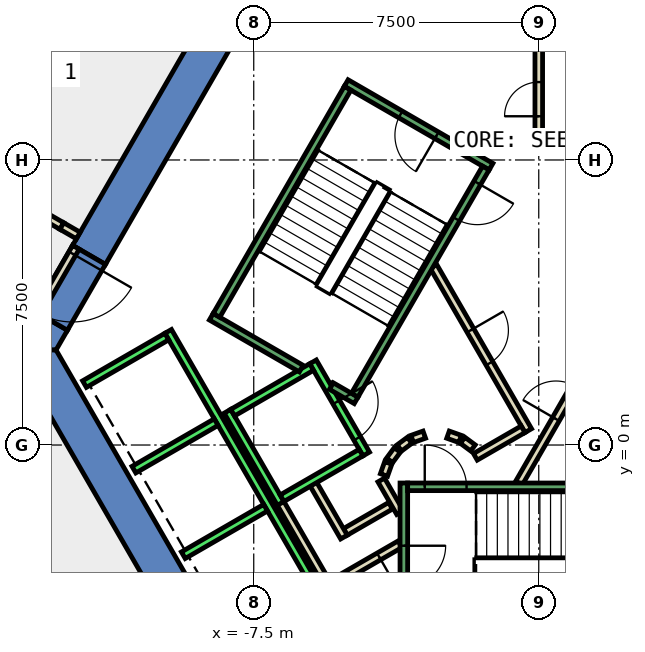
"""IFC4 building model, lengths in metres.
Left out: names, types, materials, properties, quantities, classifications, styles, units other than length and angle.
Written with IfcOpenShell. Run it as: python <this file> out.ifc"""

import sys

from ifc_helpers import new_model, si_unit, direction, frame, frame_2d, origin, place, context, subcontext, project, spatial, polyline, rectangle, outline, extrude, element, fill, save


model = new_model("IFC4")
c1 = context("Model", 3, precision=1e-05, world=origin(), true_north=direction((0.0, 1.0)))
c2 = subcontext(c1, "Body", "Model", "MODEL_VIEW")
j1 = project(units=[si_unit("LENGTHUNIT", "METRE"), si_unit("PLANEANGLEUNIT", "RADIAN")], contexts=[c1])
p1 = place(None, origin())
s1 = spatial("IfcSite", under=j1, at=p1, CompositionType="ELEMENT")
p2 = place(p1, origin())
s2 = spatial("IfcBuilding", under=s1, at=p2, CompositionType="ELEMENT")
p3 = place(p2, frame((0.0, 0.0, 60.2)))
s3 = spatial("IfcBuildingStorey", under=s2, at=p3, CompositionType="ELEMENT", Elevation=60.2)
p4 = place(p3, frame((0.0, 0.0, -0.4)))
e1 = element("IfcWall", 1, at=p4, inside=s3, PredefinedType="SHEAR", context=c2, shape_type="SweptSolid", body=[
    extrude(outline(polyline([(-12.267, 5.252), (-11.402, 4.752), (-6.351, 13.5), (-6.928, 14.5), (-12.267, 5.252)])), origin(), (0.0, 0.0, 1.0), 4.2),
])
p5 = place(p3, frame((0.0, 0.0, -0.4)))
e2 = element("IfcWall", 2, at=p5, inside=s3, PredefinedType="SHEAR", context=c2, shape_type="SweptSolid", body=[
    extrude(outline(polyline([(-12.402, 3.02), (-13.267, 3.52), (-13.856, 2.5), (-12.702, 2.5), (-12.402, 3.02)])), origin(), (0.0, 0.0, 1.0), 4.2),
])
p6 = place(p3, frame((0.0, 0.0, 3.6)))
e3 = element("IfcWall", 3, at=p6, inside=s3, PredefinedType="SHEAR", context=c2, shape_type="SweptSolid", body=[
    extrude(outline(polyline([(-13.267, 3.52), (-12.402, 3.02), (-11.402, 4.752), (-12.267, 5.252), (-13.267, 3.52)])), origin(), (0.0, 0.0, 1.0), 0.2),
])
p7 = place(p3, frame((0.0, 0.0, -0.4)))
e4 = element("IfcWall", 4, at=p7, inside=s3, PredefinedType="SHEAR", context=c2, shape_type="SweptSolid", body=[
    extrude(outline(polyline([(-13.856, 2.5), (-6.928, -9.5), (-6.351, -8.5), (-12.702, 2.5), (-13.856, 2.5)])), origin(), (0.0, 0.0, 1.0), 4.2),
])
p8 = place(p3, frame((-17.783, 8.783, 0.0), z_axis=(0.0, 0.0, 1.0), x_axis=(0.866041598752, -0.499971948444, 0.0)))
e5 = element("IfcWall", 5, at=p8, inside=s3, PredefinedType="PARTITIONING", context=c2, shape_type="SweptSolid", body=[
    extrude(rectangle(XDim=6.042, YDim=0.2, at=frame_2d((3.021, 0.0))), origin(), (0.0, 0.0, 1.0), 3.8),
])
p9 = place(p8, frame((2.771, 0.0, 0.0)))
e6 = element("IfcOpeningElement", 6, at=p9, cuts=e5, PredefinedType="OPENING", context=c2, shape_type="SweptSolid", body=[
    extrude(rectangle(XDim=1.0, YDim=2.1, at=frame_2d((0.5, 1.05))), frame((0.0, 0.11, 0.0), z_axis=(0.0, -1.0, 0.0), x_axis=(1.0, 0.0, 0.0)), (0.0, 0.0, 1.0), 0.22),
])
p10 = place(p3, frame((1.88, 7.8, 0.0), z_axis=(0.0, 0.0, 1.0), x_axis=(-1.0, 0.0, 0.0)))
e7 = element("IfcWall", 7, at=p10, inside=s3, PredefinedType="PARTITIONING", context=c2, shape_type="SweptSolid", body=[
    extrude(rectangle(XDim=1.78, YDim=0.2, at=frame_2d((0.89, 0.0))), origin(), (0.0, 0.0, 1.0), 3.8),
])
p11 = place(p3, frame((0.0, 7.7, 0.0), z_axis=(0.0, 0.0, 1.0), x_axis=(0.000325520816, 0.999999947018, 0.0)))
e8 = element("IfcWall", 8, at=p11, inside=s3, PredefinedType="PARTITIONING", context=c2, shape_type="SweptSolid", body=[
    extrude(rectangle(XDim=3.0, YDim=0.2, at=frame_2d((1.5, 0.0))), origin(), (0.0, 0.0, 1.0), 3.8),
])
p12 = place(p11, frame((0.95, 0.0, 0.0)))
e9 = element("IfcOpeningElement", 9, at=p12, cuts=e8, PredefinedType="OPENING", context=c2, shape_type="SweptSolid", body=[
    extrude(rectangle(XDim=0.9, YDim=2.1, at=frame_2d((0.45, 1.05))), frame((0.0, 0.11, 0.0), z_axis=(0.0, -1.0, 0.0), x_axis=(1.0, 0.0, 0.0)), (0.0, 0.0, 1.0), 0.22),
])
p13 = place(p3, frame((-3.9, -1.599, 0.0), z_axis=(0.0, 0.0, 1.0), x_axis=(-0.865969445389, -0.500096910261, 0.0)))
e10 = element("IfcWall", 10, at=p13, inside=s3, PredefinedType="PARTITIONING", context=c2, shape_type="SweptSolid", body=[
    extrude(rectangle(XDim=1.373, YDim=0.2, at=frame_2d((0.687, 0.0))), origin(), (0.0, 0.0, 1.0), 3.8),
])
p14 = place(p3, frame((-5.126, -2.422, 0.0), z_axis=(0.0, 0.0, 1.0), x_axis=(-0.500062241894, 0.865989465428, 0.0)))
e11 = element("IfcWall", 11, at=p14, inside=s3, PredefinedType="PARTITIONING", context=c2, shape_type="SweptSolid", body=[
    extrude(rectangle(XDim=1.7, YDim=0.2, at=frame_2d((0.85, 0.0))), origin(), (0.0, 0.0, 1.0), 3.8),
])
p15 = place(p3, frame((-3.65, -2.61, 0.0), z_axis=(0.0, 0.0, 1.0), x_axis=(-0.866072462134, -0.499918483688, 0.0)))
e12 = element("IfcWall", 12, at=p15, inside=s3, PredefinedType="PARTITIONING", context=c2, shape_type="SweptSolid", body=[
    extrude(rectangle(XDim=2.084, YDim=0.2, at=frame_2d((1.042, 0.0))), origin(), (0.0, 0.0, 1.0), 3.8),
])
p16 = place(p15, frame((0.642, 0.0, 0.0)))
e13 = element("IfcOpeningElement", 13, at=p16, cuts=e12, PredefinedType="OPENING", context=c2, shape_type="SweptSolid", body=[
    extrude(rectangle(XDim=0.9, YDim=2.1, at=frame_2d((0.45, 1.05))), frame((0.0, 0.11, 0.0), z_axis=(0.0, -1.0, 0.0), x_axis=(1.0, 0.0, 0.0)), (0.0, 0.0, 1.0), 0.22),
])
p17 = place(p3, frame((-5.492, -3.788, 0.0), z_axis=(0.0, 0.0, 1.0), x_axis=(-0.500008949224, 0.866020236886, 0.0)))
e14 = element("IfcWall", 14, at=p17, inside=s3, PredefinedType="PARTITIONING", context=c2, shape_type="SweptSolid", body=[
    extrude(rectangle(XDim=2.68, YDim=0.2, at=frame_2d((1.34, 0.0))), origin(), (0.0, 0.0, 1.0), 3.8),
])
p18 = place(p3, frame((-4.145, -0.92, 0.0), z_axis=(0.0, 0.0, 1.0), x_axis=(0.499743786207, -0.866173278362, 0.0)))
e15 = element("IfcWall", 15, at=p18, inside=s3, PredefinedType="PARTITIONING", context=c2, shape_type="SweptSolid", body=[
    extrude(rectangle(XDim=0.991, YDim=0.2, at=frame_2d((0.495, 0.0))), origin(), (0.0, 0.0, 1.0), 3.8),
])
p19 = place(p3, frame((-0.52, -1.0, 0.0), z_axis=(0.0, 0.0, 1.0), x_axis=(0.50011622646, 0.865958290007, 0.0)))
e16 = element("IfcWall", 16, at=p19, inside=s3, PredefinedType="PARTITIONING", context=c2, shape_type="SweptSolid", body=[
    extrude(rectangle(XDim=4.991, YDim=0.2, at=frame_2d((2.496, 0.0))), origin(), (0.0, 0.0, 1.0), 3.8),
])
p20 = place(p19, frame((1.945, 0.0, 0.0)))
e17 = element("IfcOpeningElement", 17, at=p20, cuts=e16, PredefinedType="OPENING", context=c2, shape_type="SweptSolid", body=[
    extrude(rectangle(XDim=1.0, YDim=2.1, at=frame_2d((0.5, 1.05))), frame((0.0, 0.11, 0.0), z_axis=(0.0, -1.0, 0.0), x_axis=(1.0, 0.0, 0.0)), (0.0, 0.0, 1.0), 0.22),
])
p21 = place(p3, frame((-2.771, 4.7, 0.0), z_axis=(0.0, 0.0, 1.0), x_axis=(0.499969479948, -0.866043023828, 0.0)))
e18 = element("IfcWall", 18, at=p21, inside=s3, PredefinedType="PARTITIONING", context=c2, shape_type="SweptSolid", body=[
    extrude(rectangle(XDim=4.99, YDim=0.2, at=frame_2d((2.495, 0.0))), origin(), (0.0, 0.0, 1.0), 3.8),
])
p22 = place(p21, frame((1.945, 0.0, 0.0)))
e19 = element("IfcOpeningElement", 19, at=p22, cuts=e18, PredefinedType="OPENING", context=c2, shape_type="SweptSolid", body=[
    extrude(rectangle(XDim=1.0, YDim=2.1, at=frame_2d((0.5, 1.05))), frame((0.0, 0.11, 0.0), z_axis=(0.0, -1.0, 0.0), x_axis=(1.0, 0.0, 0.0)), (0.0, 0.0, 1.0), 0.22),
])
p23 = place(p3, frame((-0.412, 0.414, 0.0), z_axis=(0.0, 0.0, 1.0), x_axis=(-0.866017369001, -0.500013916395, 0.0)))
e20 = element("IfcWall", 20, at=p23, inside=s3, PredefinedType="PARTITIONING", context=c2, shape_type="SweptSolid", body=[
    extrude(rectangle(XDim=1.45, YDim=0.2, at=frame_2d((0.725, 0.0))), origin(), (0.0, 0.0, 1.0), 3.8),
])
p24 = place(p3, frame((-1.731, -0.077, 0.0), z_axis=(0.0, 0.0, 1.0), x_axis=(-0.804311165252, 0.594208338422, 0.0)))
e21 = element("IfcWall", 21, at=p24, inside=s3, PredefinedType="PARTITIONING", context=c2, shape_type="SweptSolid", body=[
    extrude(rectangle(XDim=0.338, YDim=0.2, at=frame_2d((0.169, 0.0))), origin(), (0.0, 0.0, 1.0), 3.8),
])
p25 = place(p3, frame((-2.07, 0.16, 0.0), z_axis=(0.0, 0.0, 1.0), x_axis=(-0.942199461132, 0.335052496547, 0.0)))
e22 = element("IfcWall", 22, at=p25, inside=s3, PredefinedType="PARTITIONING", context=c2, shape_type="SweptSolid", body=[
    extrude(rectangle(XDim=0.337, YDim=0.2, at=frame_2d((0.169, 0.0))), origin(), (0.0, 0.0, 1.0), 3.8),
])
p26 = place(p3, frame((-3.012, 0.273, 0.0), z_axis=(0.0, 0.0, 1.0), x_axis=(-0.942280615813, -0.334824194261, 0.0)))
e23 = element("IfcWall", 23, at=p26, inside=s3, PredefinedType="PARTITIONING", context=c2, shape_type="SweptSolid", body=[
    extrude(rectangle(XDim=0.338, YDim=0.2, at=frame_2d((0.169, 0.0))), origin(), (0.0, 0.0, 1.0), 3.8),
])
p27 = place(p3, frame((-3.397, 0.124, 0.0), z_axis=(0.0, 0.0, 1.0), x_axis=(-0.804311165252, -0.594208338422, 0.0)))
e24 = element("IfcWall", 24, at=p27, inside=s3, PredefinedType="PARTITIONING", context=c2, shape_type="SweptSolid", body=[
    extrude(rectangle(XDim=0.338, YDim=0.2, at=frame_2d((0.169, 0.0))), origin(), (0.0, 0.0, 1.0), 3.8),
])
p28 = place(p3, frame((-3.723, -0.131, 0.0), z_axis=(0.0, 0.0, 1.0), x_axis=(-0.594675113454, -0.803966112121, 0.0)))
e25 = element("IfcWall", 25, at=p28, inside=s3, PredefinedType="PARTITIONING", context=c2, shape_type="SweptSolid", body=[
    extrude(rectangle(XDim=0.338, YDim=0.2, at=frame_2d((0.169, 0.0))), origin(), (0.0, 0.0, 1.0), 3.8),
])
p29 = place(p3, frame((-3.96, -0.47, 0.0), z_axis=(0.0, 0.0, 1.0), x_axis=(-0.334824194261, -0.942280615813, 0.0)))
e26 = element("IfcWall", 26, at=p29, inside=s3, PredefinedType="PARTITIONING", context=c2, shape_type="SweptSolid", body=[
    extrude(rectangle(XDim=0.338, YDim=0.2, at=frame_2d((0.169, 0.0))), origin(), (0.0, 0.0, 1.0), 3.8),
])
p30 = place(p3, frame((-12.18, 5.202, 0.0), z_axis=(0.0, 0.0, 1.0), x_axis=(-0.50002537861, -0.866010750942, 0.0)))
e27 = element("IfcWall", 27, at=p30, inside=s3, PredefinedType="PARTITIONING", context=c2, shape_type="SweptSolid", body=[
    extrude(rectangle(XDim=2.0, YDim=0.2, at=frame_2d((1.0, 0.0))), origin(), (0.0, 0.0, 1.0), 2.4),
])
p31 = place(p30, frame((0.19, 0.0, 0.0)))
e28 = element("IfcOpeningElement", 28, at=p31, cuts=e27, PredefinedType="OPENING", context=c2, shape_type="SweptSolid", body=[
    extrude(rectangle(XDim=1.8, YDim=2.1, at=frame_2d((0.9, 1.05))), frame((0.0, 0.11, 0.0), z_axis=(0.0, -1.0, 0.0), x_axis=(1.0, 0.0, 0.0)), (0.0, 0.0, 1.0), 0.22),
])
p32 = place(p3, frame((-12.55, 5.762, 0.0), z_axis=(0.0, 0.0, 1.0), x_axis=(0.866071776036, -0.499919672301, 0.0)))
e29 = element("IfcWall", 29, at=p32, inside=s3, PredefinedType="PARTITIONING", context=c2, shape_type="SweptSolid", body=[
    extrude(rectangle(XDim=0.5, YDim=0.2, at=frame_2d((0.25, 0.0))), origin(), (0.0, 0.0, 1.0), 2.4),
])
p33 = place(p3, frame((-5.94, 2.188, 0.0), z_axis=(0.0, 0.0, 1.0), x_axis=(0.49994636267, -0.866056369097, 0.0)))
e30 = element("IfcWall", 30, at=p33, inside=s3, PredefinedType="STANDARD", context=c2, shape_type="SweptSolid", body=[
    extrude(rectangle(XDim=2.8, YDim=0.2, at=frame_2d((1.4, 0.0))), origin(), (0.0, 0.0, 1.0), 3.8),
])
p34 = place(p33, frame((1.225, 0.0, 0.0)))
e31 = element("IfcOpeningElement", 31, at=p34, cuts=e30, PredefinedType="OPENING", context=c2, shape_type="SweptSolid", body=[
    extrude(rectangle(XDim=1.1, YDim=2.1, at=frame_2d((0.55, 1.05))), frame((0.0, 0.11, 0.0), z_axis=(0.0, -1.0, 0.0), x_axis=(1.0, 0.0, 0.0)), (0.0, 0.0, 1.0), 0.22),
])
p35 = place(p3, frame((-8.192, 0.888, 0.0), z_axis=(0.0, 0.0, 1.0), x_axis=(0.49994636267, -0.866056369097, 0.0)))
e32 = element("IfcWall", 32, at=p35, inside=s3, PredefinedType="STANDARD", context=c2, shape_type="SweptSolid", body=[
    extrude(rectangle(XDim=2.8, YDim=0.2, at=frame_2d((1.4, 0.0))), origin(), (0.0, 0.0, 1.0), 3.8),
])
for number, where, z_axis, x_axis in (
    (33, (-5.977, 2.052, 0.0), (0.0, 0.0, 1.0), (-0.866, -0.5, 0.0)),
    (34, (-4.677, -0.2, 0.0), (0.0, 0.0, 1.0), (-0.866, -0.5, 0.0)),
):
    element("IfcWall", number, at=place(p3, frame(where, z_axis=z_axis, x_axis=x_axis)), inside=s3, PredefinedType="STANDARD", context=c2, shape_type="SweptSolid", body=[
        extrude(rectangle(XDim=2.399, YDim=0.2, at=frame_2d((1.2, 0.0))), origin(), (0.0, 0.0, 1.0), 3.8),
    ])
p36 = place(p3, frame((-9.751, 2.99, 0.0), z_axis=(0.0, 0.0, 1.0), x_axis=(0.50000090737, -0.866024879913, 0.0)))
e35 = element("IfcWall", 35, at=p36, inside=s3, PredefinedType="STANDARD", context=c2, shape_type="SweptSolid", body=[
    extrude(rectangle(XDim=10.6, YDim=0.2, at=frame_2d((5.3, 0.0))), origin(), (0.0, 0.0, 1.0), 3.8),
])
p37 = place(p3, frame((-9.788, 2.853, 0.0), z_axis=(0.0, 0.0, 1.0), x_axis=(-0.865998541277, -0.500046524342, 0.0)))
e36 = element("IfcWall", 36, at=p37, inside=s3, PredefinedType="STANDARD", context=c2, shape_type="SweptSolid", body=[
    extrude(rectangle(XDim=2.5, YDim=0.2, at=frame_2d((1.25, 0.0))), origin(), (0.0, 0.0, 1.0), 3.8),
])
for number, where, z_axis, x_axis in (
    (37, (-8.488, 0.602, 0.0), (0.0, 0.0, 1.0), (-0.866, -0.5, 0.0)),
    (38, (-7.188, -1.65, 0.0), (0.0, 0.0, 1.0), (-0.866, -0.5, 0.0)),
):
    element("IfcWall", number, at=place(p3, frame(where, z_axis=z_axis, x_axis=x_axis)), inside=s3, PredefinedType="STANDARD", context=c2, shape_type="SweptSolid", body=[
        extrude(rectangle(XDim=2.5, YDim=0.2, at=frame_2d((1.25, 0.0))), origin(), (0.0, 0.0, 1.0), 3.8),
    ])
p38 = place(p3, frame((-3.55, -1.0, 0.0), z_axis=(0.0, 0.0, 1.0), x_axis=(0.0, -1.0, 0.0)))
e39 = element("IfcWall", 39, at=p38, inside=s3, PredefinedType="STANDARD", context=c2, shape_type="SweptSolid", body=[
    extrude(rectangle(XDim=4.4, YDim=0.2, at=frame_2d((2.2, 0.0))), origin(), (0.0, 0.0, 1.0), 3.8),
])
p39 = place(p38, frame((1.65, 0.0, 0.0)))
e40 = element("IfcOpeningElement", 40, at=p39, cuts=e39, PredefinedType="OPENING", context=c2, shape_type="SweptSolid", body=[
    extrude(rectangle(XDim=1.1, YDim=2.2, at=frame_2d((0.55, 1.1))), frame((0.0, 0.11, 0.0), z_axis=(0.0, -1.0, 0.0), x_axis=(1.0, 0.0, 0.0)), (0.0, 0.0, 1.0), 0.22),
])
p40 = place(p3, frame((-3.45, -1.1, 0.0), z_axis=(0.0, 0.0, 1.0), x_axis=(1.0, 0.0, 0.0)))
e41 = element("IfcWall", 41, at=p40, inside=s3, PredefinedType="STANDARD", context=c2, shape_type="SweptSolid", body=[
    extrude(rectangle(XDim=6.9, YDim=0.2, at=frame_2d((3.45, 0.0))), origin(), (0.0, 0.0, 1.0), 3.8),
])
p41 = place(p40, frame((0.45, 0.0, 0.0)))
e42 = element("IfcOpeningElement", 42, at=p41, cuts=e41, PredefinedType="OPENING", context=c2, shape_type="SweptSolid", body=[
    extrude(rectangle(XDim=1.1, YDim=2.2, at=frame_2d((0.55, 1.1))), frame((0.0, 0.11, 0.0), z_axis=(0.0, -1.0, 0.0), x_axis=(1.0, 0.0, 0.0)), (0.0, 0.0, 1.0), 0.22),
])
p42 = place(p3, frame((-1.256, 7.324, 0.0), z_axis=(0.0, 0.0, 1.0), x_axis=(-0.866046073146, 0.499964197906, 0.0)))
e43 = element("IfcWall", 43, at=p42, inside=s3, PredefinedType="STANDARD", context=c2, shape_type="SweptSolid", body=[
    extrude(rectangle(XDim=4.4, YDim=0.2, at=frame_2d((2.2, 0.0))), origin(), (0.0, 0.0, 1.0), 3.8),
])
p43 = place(p42, frame((1.65, 0.0, 0.0)))
e44 = element("IfcOpeningElement", 44, at=p43, cuts=e43, PredefinedType="OPENING", context=c2, shape_type="SweptSolid", body=[
    extrude(rectangle(XDim=1.1, YDim=2.2, at=frame_2d((0.55, 1.1))), frame((0.0, 0.11, 0.0), z_axis=(0.0, -1.0, 0.0), x_axis=(1.0, 0.0, 0.0)), (0.0, 0.0, 1.0), 0.22),
])
p44 = place(p3, frame((-6.25, 2.01, 0.0), z_axis=(0.0, 0.0, 1.0), x_axis=(-0.86611865017, 0.499838457731, 0.0)))
e45 = element("IfcWall", 45, at=p44, inside=s3, PredefinedType="STANDARD", context=c2, shape_type="SweptSolid", body=[
    extrude(rectangle(XDim=2.733, YDim=0.2, at=frame_2d((1.366, 0.0))), origin(), (0.0, 0.0, 1.0), 3.8),
])
p45 = place(p3, frame((-4.806, 1.176, 0.0), z_axis=(0.0, 0.0, 1.0), x_axis=(-0.866558586415, 0.499075361355, 0.0)))
e46 = element("IfcWall", 46, at=p45, inside=s3, PredefinedType="STANDARD", context=c2, shape_type="SweptSolid", body=[
    extrude(rectangle(XDim=0.751, YDim=0.2, at=frame_2d((0.376, 0.0))), origin(), (0.0, 0.0, 1.0), 3.8),
])
p46 = place(p3, frame((-1.393, 7.288, 0.0), z_axis=(0.0, 0.0, 1.0), x_axis=(-0.499963383562, -0.866046543262, 0.0)))
e47 = element("IfcWall", 47, at=p46, inside=s3, PredefinedType="STANDARD", context=c2, shape_type="SweptSolid", body=[
    extrude(rectangle(XDim=6.9, YDim=0.2, at=frame_2d((3.45, 0.0))), origin(), (0.0, 0.0, 1.0), 3.8),
])
p47 = place(p46, frame((0.45, 0.0, 0.0)))
e48 = element("IfcOpeningElement", 48, at=p47, cuts=e47, PredefinedType="OPENING", context=c2, shape_type="SweptSolid", body=[
    extrude(rectangle(XDim=1.1, YDim=2.2, at=frame_2d((0.55, 1.1))), frame((0.0, 0.11, 0.0), z_axis=(0.0, -1.0, 0.0), x_axis=(1.0, 0.0, 0.0)), (0.0, 0.0, 1.0), 0.22),
])
p48 = place(p3, frame((-5.03, 9.388, 0.0), z_axis=(0.0, 0.0, 1.0), x_axis=(-0.499978703459, -0.866037698999, 0.0)))
e49 = element("IfcWall", 49, at=p48, inside=s3, PredefinedType="STANDARD", context=c2, shape_type="SweptSolid", body=[
    extrude(rectangle(XDim=6.9, YDim=0.2, at=frame_2d((3.45, 0.0))), origin(), (0.0, 0.0, 1.0), 3.8),
])
p49 = place(p20, origin())
e50 = element("IfcDoor", 50, at=p49, inside=s3, OperationType="SINGLE_SWING_LEFT", PredefinedType="DOOR", context=c2, shape_type="SweptSolid", body=[
    extrude(rectangle(XDim=1.0, YDim=2.1, at=frame_2d((0.5, 1.05))), frame((0.0, 0.025, 0.0), z_axis=(0.0, -1.0, 0.0), x_axis=(1.0, 0.0, 0.0)), (0.0, 0.0, 1.0), 0.05),
])
fill(e17, e50)
p50 = place(p22, origin())
e51 = element("IfcDoor", 51, at=p50, inside=s3, OperationType="SINGLE_SWING_RIGHT", PredefinedType="DOOR", context=c2, shape_type="SweptSolid", body=[
    extrude(rectangle(XDim=1.0, YDim=2.1, at=frame_2d((0.5, 1.05))), frame((0.0, 0.025, 0.0), z_axis=(0.0, -1.0, 0.0), x_axis=(1.0, 0.0, 0.0)), (0.0, 0.0, 1.0), 0.05),
])
fill(e19, e51)
p51 = place(p12, origin())
e52 = element("IfcDoor", 52, at=p51, inside=s3, OperationType="SINGLE_SWING_RIGHT", PredefinedType="DOOR", context=c2, shape_type="SweptSolid", body=[
    extrude(rectangle(XDim=0.9, YDim=2.1, at=frame_2d((0.45, 1.05))), frame((0.0, 0.025, 0.0), z_axis=(0.0, -1.0, 0.0), x_axis=(1.0, 0.0, 0.0)), (0.0, 0.0, 1.0), 0.05),
])
fill(e9, e52)
p52 = place(p16, origin())
e53 = element("IfcDoor", 53, at=p52, inside=s3, OperationType="SINGLE_SWING_LEFT", PredefinedType="DOOR", context=c2, shape_type="SweptSolid", body=[
    extrude(rectangle(XDim=0.9, YDim=2.1, at=frame_2d((0.45, 1.05))), frame((0.0, 0.025, 0.0), z_axis=(0.0, -1.0, 0.0), x_axis=(1.0, 0.0, 0.0)), (0.0, 0.0, 1.0), 0.05),
])
fill(e13, e53)
p53 = place(p31, origin())
e54 = element("IfcDoor", 54, at=p53, inside=s3, OperationType="DOUBLE_DOOR_SINGLE_SWING", PredefinedType="DOOR", context=c2, shape_type="SweptSolid", body=[
    extrude(rectangle(XDim=1.8, YDim=2.1, at=frame_2d((0.9, 1.05))), frame((0.0, 0.025, 0.0), z_axis=(0.0, -1.0, 0.0), x_axis=(1.0, 0.0, 0.0)), (0.0, 0.0, 1.0), 0.05),
])
fill(e28, e54)
p54 = place(p34, origin())
e55 = element("IfcDoor", 55, at=p54, inside=s3, OperationType="SLIDING_TO_LEFT", PredefinedType="DOOR", context=c2, shape_type="SweptSolid", body=[
    extrude(rectangle(XDim=1.1, YDim=2.1, at=frame_2d((0.55, 1.05))), frame((0.0, 0.025, 0.0), z_axis=(0.0, -1.0, 0.0), x_axis=(1.0, 0.0, 0.0)), (0.0, 0.0, 1.0), 0.05),
])
fill(e31, e55)
p55 = place(p41, origin())
e56 = element("IfcDoor", 56, at=p55, inside=s3, OperationType="SINGLE_SWING_LEFT", PredefinedType="DOOR", context=c2, shape_type="SweptSolid", body=[
    extrude(rectangle(XDim=1.1, YDim=2.2, at=frame_2d((0.55, 1.1))), frame((0.0, 0.025, 0.0), z_axis=(0.0, -1.0, 0.0), x_axis=(1.0, 0.0, 0.0)), (0.0, 0.0, 1.0), 0.05),
])
fill(e42, e56)
p56 = place(p39, origin())
e57 = element("IfcDoor", 57, at=p56, inside=s3, OperationType="SINGLE_SWING_LEFT", PredefinedType="DOOR", context=c2, shape_type="SweptSolid", body=[
    extrude(rectangle(XDim=1.1, YDim=2.2, at=frame_2d((0.55, 1.1))), frame((0.0, 0.025, 0.0), z_axis=(0.0, -1.0, 0.0), x_axis=(1.0, 0.0, 0.0)), (0.0, 0.0, 1.0), 0.05),
])
fill(e40, e57)
p57 = place(p47, origin())
e58 = element("IfcDoor", 58, at=p57, inside=s3, OperationType="SINGLE_SWING_LEFT", PredefinedType="DOOR", context=c2, shape_type="SweptSolid", body=[
    extrude(rectangle(XDim=1.1, YDim=2.2, at=frame_2d((0.55, 1.1))), frame((0.0, 0.025, 0.0), z_axis=(0.0, -1.0, 0.0), x_axis=(1.0, 0.0, 0.0)), (0.0, 0.0, 1.0), 0.05),
])
fill(e48, e58)
p58 = place(p43, origin())
e59 = element("IfcDoor", 59, at=p58, inside=s3, OperationType="SINGLE_SWING_LEFT", PredefinedType="DOOR", context=c2, shape_type="SweptSolid", body=[
    extrude(rectangle(XDim=1.1, YDim=2.2, at=frame_2d((0.55, 1.1))), frame((0.0, 0.025, 0.0), z_axis=(0.0, -1.0, 0.0), x_axis=(1.0, 0.0, 0.0)), (0.0, 0.0, 1.0), 0.05),
])
fill(e44, e59)
save(model, sys.argv[1])
